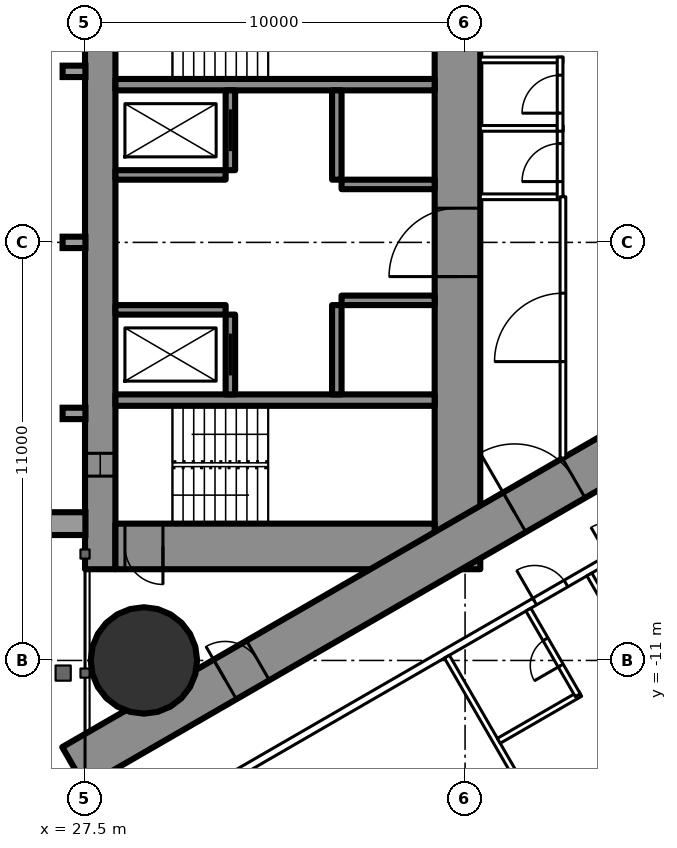
"""IFC4 building model, lengths in metres.
Left out: names, types, materials, properties, quantities, classifications, styles, units other than length and angle.
Written with IfcOpenShell. Run it as: python <this file> out.ifc"""

import sys

from ifc_helpers import new_model, si_unit, direction, frame, frame_2d, origin, origin_2d, place, context, subcontext, project, spatial, rectangle, circle, extrude, element, fill, save


model = new_model("IFC4")
c1 = context("Model", 3, precision=1e-05, world=origin(), true_north=direction((0.0, 1.0)))
c2 = subcontext(c1, "Body", "Model", "MODEL_VIEW")
j1 = project(units=[si_unit("LENGTHUNIT", "METRE"), si_unit("PLANEANGLEUNIT", "RADIAN")], contexts=[c1])
p1 = place(None, origin())
s1 = spatial("IfcSite", under=j1, at=p1, CompositionType="ELEMENT")
p2 = place(p1, origin())
s2 = spatial("IfcBuilding", under=s1, at=p2, CompositionType="ELEMENT")
p3 = place(p2, frame((0.0, 0.0, 198.3)))
s3 = spatial("IfcBuildingStorey", under=s2, at=p3, CompositionType="ELEMENT", Elevation=198.3)
p4 = place(p3, frame((29.05, -11.0, 0.0), z_axis=(0.0, 0.0, 1.0), x_axis=(1.0, 0.0, 0.0)))
e1 = element("IfcColumn", 1, at=p4, inside=s3, PredefinedType="COLUMN", context=c2, shape_type="SweptSolid", body=[
    extrude(circle(Radius=1.4, at=origin_2d()), origin(), (0.0, 0.0, 1.0), 3.5),
])
p5 = place(p3, frame((27.9, -8.6, 0.0), z_axis=(0.0, 0.0, 1.0), x_axis=(0.0, 1.0, 0.0)))
e2 = element("IfcWall", 2, at=p5, inside=s3, PredefinedType="SHEAR", context=c2, shape_type="SweptSolid", body=[
    extrude(rectangle(XDim=17.2, YDim=0.8, at=frame_2d((8.6, 0.0))), origin(), (0.0, 0.0, 1.0), 3.5),
])
p6 = place(p5, frame((2.45, 0.0, 0.6)))
e3 = element("IfcOpeningElement", 3, at=p6, cuts=e2, PredefinedType="OPENING", context=c2, shape_type="SweptSolid", body=[
    extrude(rectangle(XDim=0.6, YDim=2.1, at=frame_2d((0.3, 1.05))), frame((0.0, 0.41, 0.0), z_axis=(0.0, -1.0, 0.0), x_axis=(1.0, 0.0, 0.0)), (0.0, 0.0, 1.0), 0.82),
])
p7 = place(p5, frame((14.15, 0.0, 0.6)))
e4 = element("IfcOpeningElement", 4, at=p7, cuts=e2, PredefinedType="OPENING", context=c2, shape_type="SweptSolid", body=[
    extrude(rectangle(XDim=0.6, YDim=2.1, at=frame_2d((0.3, 1.05))), frame((0.0, 0.41, 0.0), z_axis=(0.0, -1.0, 0.0), x_axis=(1.0, 0.0, 0.0)), (0.0, 0.0, 1.0), 0.82),
])
p8 = place(p3, frame((37.3, -8.6, 0.0), z_axis=(0.0, 0.0, 1.0), x_axis=(0.0, 1.0, 0.0)))
e5 = element("IfcWall", 5, at=p8, inside=s3, PredefinedType="SHEAR", context=c2, shape_type="SweptSolid", body=[
    extrude(rectangle(XDim=17.2, YDim=1.2, at=frame_2d((8.6, 0.0))), origin(), (0.0, 0.0, 1.0), 3.5),
])
p9 = place(p8, frame((7.7, 0.0, 0.0)))
e6 = element("IfcOpeningElement", 6, at=p9, cuts=e5, PredefinedType="OPENING", context=c2, shape_type="SweptSolid", body=[
    extrude(rectangle(XDim=1.8, YDim=2.2, at=frame_2d((0.9, 1.1))), frame((0.0, 0.61, 0.0), z_axis=(0.0, -1.0, 0.0), x_axis=(1.0, 0.0, 0.0)), (0.0, 0.0, 1.0), 1.22),
])
p10 = place(p3, frame((28.3, -8.0, 0.0), z_axis=(0.0, 0.0, 1.0), x_axis=(1.0, 0.0, 0.0)))
e7 = element("IfcWall", 7, at=p10, inside=s3, PredefinedType="SHEAR", context=c2, shape_type="SweptSolid", body=[
    extrude(rectangle(XDim=8.4, YDim=1.2, at=frame_2d((4.2, 0.0))), origin(), (0.0, 0.0, 1.0), 3.5),
])
p11 = place(p10, frame((0.25, 0.0, 0.0)))
e8 = element("IfcOpeningElement", 8, at=p11, cuts=e7, PredefinedType="OPENING", context=c2, shape_type="SweptSolid", body=[
    extrude(rectangle(XDim=1.0, YDim=2.2, at=frame_2d((0.5, 1.1))), frame((0.0, 0.61, 0.0), z_axis=(0.0, -1.0, 0.0), x_axis=(1.0, 0.0, 0.0)), (0.0, 0.0, 1.0), 1.22),
])
for number, where, z_axis, x_axis in (
    (9, (28.3, -4.15, 0.0), (0.0, 0.0, 1.0), (1.0, 0.0, 0.0)),
    (10, (28.3, 4.15, 0.0), (0.0, 0.0, 1.0), (1.0, 0.0, 0.0)),
):
    element("IfcWall", number, at=place(p3, frame(where, z_axis=z_axis, x_axis=x_axis)), inside=s3, PredefinedType="SHEAR", context=c2, shape_type="SweptSolid", body=[
        extrude(rectangle(XDim=8.4, YDim=0.3, at=frame_2d((4.2, 0.0))), origin(), (0.0, 0.0, 1.0), 3.5),
    ])
p12 = place(p3, frame((31.325, -4.0, 0.0), z_axis=(0.0, 0.0, 1.0), x_axis=(0.0, 1.0, 0.0)))
e11 = element("IfcWall", 11, at=p12, inside=s3, PredefinedType="SHEAR", context=c2, shape_type="SweptSolid", body=[
    extrude(rectangle(XDim=2.1, YDim=0.25, at=frame_2d((1.05, 0.0))), origin(), (0.0, 0.0, 1.0), 3.5),
])
p13 = place(p12, frame((0.5, 0.0, 0.0)))
e12 = element("IfcOpeningElement", 12, at=p13, cuts=e11, PredefinedType="OPENING", context=c2, shape_type="SweptSolid", body=[
    extrude(rectangle(XDim=1.1, YDim=2.2, at=frame_2d((0.55, 1.1))), frame((0.0, 0.135, 0.0), z_axis=(0.0, -1.0, 0.0), x_axis=(1.0, 0.0, 0.0)), (0.0, 0.0, 1.0), 0.27),
])
p14 = place(p3, frame((34.125, -4.0, 0.0), z_axis=(0.0, 0.0, 1.0), x_axis=(0.0, 1.0, 0.0)))
e13 = element("IfcWall", 13, at=p14, inside=s3, PredefinedType="SHEAR", context=c2, shape_type="SweptSolid", body=[
    extrude(rectangle(XDim=2.35, YDim=0.25, at=frame_2d((1.175, 0.0))), origin(), (0.0, 0.0, 1.0), 3.5),
])
p15 = place(p3, frame((28.3, -1.775, 0.0), z_axis=(0.0, 0.0, 1.0), x_axis=(1.0, 0.0, 0.0)))
e14 = element("IfcWall", 14, at=p15, inside=s3, PredefinedType="SHEAR", context=c2, shape_type="SweptSolid", body=[
    extrude(rectangle(XDim=2.9, YDim=0.25, at=frame_2d((1.45, 0.0))), origin(), (0.0, 0.0, 1.0), 3.5),
])
p16 = place(p3, frame((34.25, -1.525, 0.0), z_axis=(0.0, 0.0, 1.0), x_axis=(1.0, 0.0, 0.0)))
e15 = element("IfcWall", 15, at=p16, inside=s3, PredefinedType="SHEAR", context=c2, shape_type="SweptSolid", body=[
    extrude(rectangle(XDim=2.45, YDim=0.25, at=frame_2d((1.225, 0.0))), origin(), (0.0, 0.0, 1.0), 3.5),
])
p17 = place(p3, frame((31.325, 1.9, 0.0), z_axis=(0.0, 0.0, 1.0), x_axis=(0.0, 1.0, 0.0)))
e16 = element("IfcWall", 16, at=p17, inside=s3, PredefinedType="SHEAR", context=c2, shape_type="SweptSolid", body=[
    extrude(rectangle(XDim=2.1, YDim=0.25, at=frame_2d((1.05, 0.0))), origin(), (0.0, 0.0, 1.0), 3.5),
])
p18 = place(p17, frame((0.5, 0.0, 0.0)))
e17 = element("IfcOpeningElement", 17, at=p18, cuts=e16, PredefinedType="OPENING", context=c2, shape_type="SweptSolid", body=[
    extrude(rectangle(XDim=1.1, YDim=2.2, at=frame_2d((0.55, 1.1))), frame((0.0, 0.135, 0.0), z_axis=(0.0, -1.0, 0.0), x_axis=(1.0, 0.0, 0.0)), (0.0, 0.0, 1.0), 0.27),
])
p19 = place(p3, frame((34.125, 1.65, 0.0), z_axis=(0.0, 0.0, 1.0), x_axis=(0.0, 1.0, 0.0)))
e18 = element("IfcWall", 18, at=p19, inside=s3, PredefinedType="SHEAR", context=c2, shape_type="SweptSolid", body=[
    extrude(rectangle(XDim=2.35, YDim=0.25, at=frame_2d((1.175, 0.0))), origin(), (0.0, 0.0, 1.0), 3.5),
])
p20 = place(p3, frame((28.3, 1.775, 0.0), z_axis=(0.0, 0.0, 1.0), x_axis=(1.0, 0.0, 0.0)))
e19 = element("IfcWall", 19, at=p20, inside=s3, PredefinedType="SHEAR", context=c2, shape_type="SweptSolid", body=[
    extrude(rectangle(XDim=2.9, YDim=0.25, at=frame_2d((1.45, 0.0))), origin(), (0.0, 0.0, 1.0), 3.5),
])
p21 = place(p3, frame((34.25, 1.525, 0.0), z_axis=(0.0, 0.0, 1.0), x_axis=(1.0, 0.0, 0.0)))
e20 = element("IfcWall", 20, at=p21, inside=s3, PredefinedType="SHEAR", context=c2, shape_type="SweptSolid", body=[
    extrude(rectangle(XDim=2.45, YDim=0.25, at=frame_2d((1.225, 0.0))), origin(), (0.0, 0.0, 1.0), 3.5),
])
p22 = place(p3, frame((27.2, -13.8, 0.0), z_axis=(0.0, 0.0, 1.0), x_axis=(0.866027159892, 0.499996958321, 0.0)))
e21 = element("IfcWall", 21, at=p22, inside=s3, PredefinedType="SHEAR", context=c2, shape_type="SweptSolid", body=[
    extrude(rectangle(XDim=27.947, YDim=1.2, at=frame_2d((13.973, 0.0))), origin(), (0.0, 0.0, 1.0), 3.5),
])
p23 = place(p22, frame((4.6, 0.0, 0.0)))
e22 = element("IfcOpeningElement", 22, at=p23, cuts=e21, PredefinedType="OPENING", context=c2, shape_type="SweptSolid", body=[
    extrude(rectangle(XDim=1.0, YDim=2.2, at=frame_2d((0.5, 1.1))), frame((0.0, 0.61, 0.0), z_axis=(0.0, -1.0, 0.0), x_axis=(1.0, 0.0, 0.0)), (0.0, 0.0, 1.0), 1.22),
])
p24 = place(p22, frame((13.395, 0.0, 0.0)))
e23 = element("IfcOpeningElement", 23, at=p24, cuts=e21, PredefinedType="OPENING", context=c2, shape_type="SweptSolid", body=[
    extrude(rectangle(XDim=1.8, YDim=2.2, at=frame_2d((0.9, 1.1))), frame((0.0, 0.61, 0.0), z_axis=(0.0, -1.0, 0.0), x_axis=(1.0, 0.0, 0.0)), (0.0, 0.0, 1.0), 1.22),
])
p25 = place(p3, frame((27.2, 13.8, 0.0), z_axis=(0.0, 0.0, 1.0), x_axis=(0.866024515034, -0.500001539357, 0.0)))
e24 = element("IfcWall", 24, at=p25, inside=s3, PredefinedType="SHEAR", context=c2, shape_type="SweptSolid", body=[
    extrude(rectangle(XDim=26.907, YDim=1.2, at=frame_2d((13.454, 0.0))), origin(), (0.0, 0.0, 1.0), 3.5),
])
p26 = place(p25, frame((4.6, 0.0, 0.0)))
e25 = element("IfcOpeningElement", 25, at=p26, cuts=e24, PredefinedType="OPENING", context=c2, shape_type="SweptSolid", body=[
    extrude(rectangle(XDim=1.0, YDim=2.2, at=frame_2d((0.5, 1.1))), frame((0.0, 0.61, 0.0), z_axis=(0.0, -1.0, 0.0), x_axis=(1.0, 0.0, 0.0)), (0.0, 0.0, 1.0), 1.22),
])
p27 = place(p25, frame((13.395, 0.0, 0.0)))
e26 = element("IfcOpeningElement", 26, at=p27, cuts=e24, PredefinedType="OPENING", context=c2, shape_type="SweptSolid", body=[
    extrude(rectangle(XDim=1.8, YDim=2.2, at=frame_2d((0.9, 1.1))), frame((0.0, 0.61, 0.0), z_axis=(0.0, -1.0, 0.0), x_axis=(1.0, 0.0, 0.0)), (0.0, 0.0, 1.0), 1.22),
])
p28 = place(p3, frame((27.959, -16.017, 0.0), z_axis=(0.0, 0.0, 1.0), x_axis=(0.866024151371, 0.500002169237, 0.0)))
e27 = element("IfcWall", 27, at=p28, inside=s3, PredefinedType="PARTITIONING", context=c2, shape_type="SweptSolid", body=[
    extrude(rectangle(XDim=32.034, YDim=0.2, at=frame_2d((16.017, 0.0))), origin(), (0.0, 0.0, 1.0), 3.25),
])
p29 = place(p28, frame((0.6, 0.0, 0.0)))
e28 = element("IfcOpeningElement", 28, at=p29, cuts=e27, PredefinedType="OPENING", context=c2, shape_type="SweptSolid", body=[
    extrude(rectangle(XDim=0.95, YDim=2.2, at=frame_2d((0.475, 1.1))), frame((0.0, 0.11, 0.0), z_axis=(0.0, -1.0, 0.0), x_axis=(1.0, 0.0, 0.0)), (0.0, 0.0, 1.0), 0.22),
])
p30 = place(p28, frame((13.132, 0.0, 0.0)))
e29 = element("IfcOpeningElement", 29, at=p30, cuts=e27, PredefinedType="OPENING", context=c2, shape_type="SweptSolid", body=[
    extrude(rectangle(XDim=0.95, YDim=2.2, at=frame_2d((0.475, 1.1))), frame((0.0, 0.11, 0.0), z_axis=(0.0, -1.0, 0.0), x_axis=(1.0, 0.0, 0.0)), (0.0, 0.0, 1.0), 0.22),
])
p31 = place(p28, frame((15.391, 0.0, 0.0)))
e30 = element("IfcOpeningElement", 30, at=p31, cuts=e27, PredefinedType="OPENING", context=c2, shape_type="SweptSolid", body=[
    extrude(rectangle(XDim=0.95, YDim=2.2, at=frame_2d((0.475, 1.1))), frame((0.0, 0.11, 0.0), z_axis=(0.0, -1.0, 0.0), x_axis=(1.0, 0.0, 0.0)), (0.0, 0.0, 1.0), 0.22),
])
p32 = place(p28, frame((19.441, 0.0, 0.0)))
e31 = element("IfcOpeningElement", 31, at=p32, cuts=e27, PredefinedType="OPENING", context=c2, shape_type="SweptSolid", body=[
    extrude(rectangle(XDim=0.95, YDim=2.2, at=frame_2d((0.475, 1.1))), frame((0.0, 0.11, 0.0), z_axis=(0.0, -1.0, 0.0), x_axis=(1.0, 0.0, 0.0)), (0.0, 0.0, 1.0), 0.22),
])
p33 = place(p28, frame((26.406, 0.0, 0.0)))
e32 = element("IfcOpeningElement", 32, at=p33, cuts=e27, PredefinedType="OPENING", context=c2, shape_type="SweptSolid", body=[
    extrude(rectangle(XDim=0.95, YDim=2.2, at=frame_2d((0.475, 1.1))), frame((0.0, 0.11, 0.0), z_axis=(0.0, -1.0, 0.0), x_axis=(1.0, 0.0, 0.0)), (0.0, 0.0, 1.0), 0.22),
])
p34 = place(p28, frame((28.87, 0.0, 0.0)))
e33 = element("IfcOpeningElement", 33, at=p34, cuts=e27, PredefinedType="OPENING", context=c2, shape_type="SweptSolid", body=[
    extrude(rectangle(XDim=1.8, YDim=2.2, at=frame_2d((0.9, 1.1))), frame((0.0, 0.11, 0.0), z_axis=(0.0, -1.0, 0.0), x_axis=(1.0, 0.0, 0.0)), (0.0, 0.0, 1.0), 0.22),
])
p35 = place(p3, frame((37.022, -10.9, 0.0), z_axis=(0.0, 0.0, 1.0), x_axis=(0.499998620953, -0.866026199976, 0.0)))
e34 = element("IfcWall", 34, at=p35, inside=s3, PredefinedType="PARTITIONING", context=c2, shape_type="SweptSolid", body=[
    extrude(rectangle(XDim=9.77, YDim=0.15, at=frame_2d((4.885, 0.0))), origin(), (0.0, 0.0, 1.0), 3.25),
])
p36 = place(p3, frame((40.769, -8.737, 0.0), z_axis=(0.0, 0.0, 1.0), x_axis=(0.500013115284, -0.866017831539, 0.0)))
e35 = element("IfcWall", 35, at=p36, inside=s3, PredefinedType="PARTITIONING", context=c2, shape_type="SweptSolid", body=[
    extrude(rectangle(XDim=7.198, YDim=0.15, at=frame_2d((3.599, 0.0))), origin(), (0.0, 0.0, 1.0), 2.3),
])
p37 = place(p3, frame((38.387, -13.115, 0.0), z_axis=(0.0, 0.0, 1.0), x_axis=(0.866073894602, 0.499916002032, 0.0)))
e36 = element("IfcWall", 36, at=p37, inside=s3, PredefinedType="PARTITIONING", context=c2, shape_type="SweptSolid", body=[
    extrude(rectangle(XDim=2.475, YDim=0.15, at=frame_2d((1.238, 0.0))), origin(), (0.0, 0.0, 1.0), 3.25),
])
p38 = place(p3, frame((39.166, -9.663, 0.0), z_axis=(0.0, 0.0, 1.0), x_axis=(0.500006934395, -0.866021400173, 0.0)))
e37 = element("IfcWall", 37, at=p38, inside=s3, PredefinedType="PARTITIONING", context=c2, shape_type="SweptSolid", body=[
    extrude(rectangle(XDim=2.6, YDim=0.15, at=frame_2d((1.3, 0.0))), origin(), (0.0, 0.0, 1.0), 3.25),
])
p39 = place(p38, frame((0.9, 0.0, 0.0)))
e38 = element("IfcOpeningElement", 38, at=p39, cuts=e37, PredefinedType="OPENING", context=c2, shape_type="SweptSolid", body=[
    extrude(rectangle(XDim=0.8, YDim=2.2, at=frame_2d((0.4, 1.1))), frame((0.0, 0.085, 0.0), z_axis=(0.0, -1.0, 0.0), x_axis=(1.0, 0.0, 0.0)), (0.0, 0.0, 1.0), 0.17),
])
for number, where, z_axis, x_axis in (
    (39, (37.9, 1.2, 0.0), (0.0, 0.0, 1.0), (1.0, 0.0, 0.0)),
    (40, (37.9, 3.0, 0.0), (0.0, 0.0, 1.0), (1.0, 0.0, 0.0)),
    (41, (37.9, 4.8, 0.0), (0.0, 0.0, 1.0), (1.0, 0.0, 0.0)),
):
    element("IfcWall", number, at=place(p3, frame(where, z_axis=z_axis, x_axis=x_axis)), inside=s3, PredefinedType="PARTITIONING", context=c2, shape_type="SweptSolid", body=[
        extrude(rectangle(XDim=2.175, YDim=0.15, at=frame_2d((1.087, 0.0))), origin(), (0.0, 0.0, 1.0), 3.25),
    ])
p40 = place(p3, frame((40.0, 1.125, 0.0), z_axis=(0.0, 0.0, 1.0), x_axis=(0.0, 1.0, 0.0)))
e42 = element("IfcWall", 42, at=p40, inside=s3, PredefinedType="PARTITIONING", context=c2, shape_type="SweptSolid", body=[
    extrude(rectangle(XDim=1.95, YDim=0.15, at=frame_2d((0.975, 0.0))), origin(), (0.0, 0.0, 1.0), 3.25),
])
p41 = place(p40, frame((0.475, 0.0, 0.0)))
e43 = element("IfcOpeningElement", 43, at=p41, cuts=e42, PredefinedType="OPENING", context=c2, shape_type="SweptSolid", body=[
    extrude(rectangle(XDim=1.0, YDim=2.2, at=frame_2d((0.5, 1.1))), frame((0.0, 0.085, 0.0), z_axis=(0.0, -1.0, 0.0), x_axis=(1.0, 0.0, 0.0)), (0.0, 0.0, 1.0), 0.17),
])
p42 = place(p3, frame((40.0, 2.925, 0.0), z_axis=(0.0, 0.0, 1.0), x_axis=(0.0, 1.0, 0.0)))
e44 = element("IfcWall", 44, at=p42, inside=s3, PredefinedType="PARTITIONING", context=c2, shape_type="SweptSolid", body=[
    extrude(rectangle(XDim=1.95, YDim=0.15, at=frame_2d((0.975, 0.0))), origin(), (0.0, 0.0, 1.0), 3.25),
])
p43 = place(p42, frame((0.475, 0.0, 0.0)))
e45 = element("IfcOpeningElement", 45, at=p43, cuts=e44, PredefinedType="OPENING", context=c2, shape_type="SweptSolid", body=[
    extrude(rectangle(XDim=1.0, YDim=2.2, at=frame_2d((0.5, 1.1))), frame((0.0, 0.085, 0.0), z_axis=(0.0, -1.0, 0.0), x_axis=(1.0, 0.0, 0.0)), (0.0, 0.0, 1.0), 0.17),
])
p44 = place(p3, frame((40.075, -5.674, 0.0), z_axis=(0.0, 0.0, 1.0), x_axis=(0.0, 1.0, 0.0)))
e46 = element("IfcWall", 46, at=p44, inside=s3, PredefinedType="PARTITIONING", context=c2, shape_type="SweptSolid", body=[
    extrude(rectangle(XDim=6.874, YDim=0.15, at=frame_2d((3.437, 0.0))), origin(), (0.0, 0.0, 1.0), 3.25),
])
p45 = place(p44, frame((2.537, 0.0, 0.0)))
e47 = element("IfcOpeningElement", 47, at=p45, cuts=e46, PredefinedType="OPENING", context=c2, shape_type="SweptSolid", body=[
    extrude(rectangle(XDim=1.8, YDim=2.2, at=frame_2d((0.9, 1.1))), frame((0.0, 0.085, 0.0), z_axis=(0.0, -1.0, 0.0), x_axis=(1.0, 0.0, 0.0)), (0.0, 0.0, 1.0), 0.17),
])
p46 = place(p39, origin())
e48 = element("IfcDoor", 48, at=p46, inside=s3, OperationType="SINGLE_SWING_RIGHT", PredefinedType="DOOR", context=c2, shape_type="SweptSolid", body=[
    extrude(rectangle(XDim=0.8, YDim=2.2, at=frame_2d((0.4, 1.1))), frame((0.0, 0.025, 0.0), z_axis=(0.0, -1.0, 0.0), x_axis=(1.0, 0.0, 0.0)), (0.0, 0.0, 1.0), 0.05),
])
fill(e38, e48)
p47 = place(p30, origin())
e49 = element("IfcDoor", 49, at=p47, inside=s3, OperationType="SINGLE_SWING_LEFT", PredefinedType="DOOR", context=c2, shape_type="SweptSolid", body=[
    extrude(rectangle(XDim=0.95, YDim=2.2, at=frame_2d((0.475, 1.1))), frame((0.0, 0.025, 0.0), z_axis=(0.0, -1.0, 0.0), x_axis=(1.0, 0.0, 0.0)), (0.0, 0.0, 1.0), 0.05),
])
fill(e29, e49)
p48 = place(p41, origin())
e50 = element("IfcDoor", 50, at=p48, inside=s3, OperationType="SINGLE_SWING_LEFT", PredefinedType="DOOR", context=c2, shape_type="SweptSolid", body=[
    extrude(rectangle(XDim=1.0, YDim=2.2, at=frame_2d((0.5, 1.1))), frame((0.0, 0.025, 0.0), z_axis=(0.0, -1.0, 0.0), x_axis=(1.0, 0.0, 0.0)), (0.0, 0.0, 1.0), 0.05),
])
fill(e43, e50)
p49 = place(p43, origin())
e51 = element("IfcDoor", 51, at=p49, inside=s3, OperationType="SINGLE_SWING_LEFT", PredefinedType="DOOR", context=c2, shape_type="SweptSolid", body=[
    extrude(rectangle(XDim=1.0, YDim=2.2, at=frame_2d((0.5, 1.1))), frame((0.0, 0.025, 0.0), z_axis=(0.0, -1.0, 0.0), x_axis=(1.0, 0.0, 0.0)), (0.0, 0.0, 1.0), 0.05),
])
fill(e45, e51)
p50 = place(p45, origin())
e52 = element("IfcDoor", 52, at=p50, inside=s3, OperationType="DOUBLE_DOOR_SINGLE_SWING", PredefinedType="DOOR", context=c2, shape_type="SweptSolid", body=[
    extrude(rectangle(XDim=1.8, YDim=2.2, at=frame_2d((0.9, 1.1))), frame((0.0, 0.025, 0.0), z_axis=(0.0, -1.0, 0.0), x_axis=(1.0, 0.0, 0.0)), (0.0, 0.0, 1.0), 0.05),
])
fill(e47, e52)
p51 = place(p23, origin())
e53 = element("IfcDoor", 53, at=p51, inside=s3, OperationType="SINGLE_SWING_LEFT", PredefinedType="DOOR", context=c2, shape_type="SweptSolid", body=[
    extrude(rectangle(XDim=1.0, YDim=2.2, at=frame_2d((0.5, 1.1))), frame((0.0, 0.025, 0.0), z_axis=(0.0, -1.0, 0.0), x_axis=(1.0, 0.0, 0.0)), (0.0, 0.0, 1.0), 0.05),
])
fill(e22, e53)
p52 = place(p24, origin())
e54 = element("IfcDoor", 54, at=p52, inside=s3, OperationType="DOUBLE_DOOR_SINGLE_SWING", PredefinedType="DOOR", context=c2, shape_type="SweptSolid", body=[
    extrude(rectangle(XDim=1.8, YDim=2.2, at=frame_2d((0.9, 1.1))), frame((0.0, 0.025, 0.0), z_axis=(0.0, -1.0, 0.0), x_axis=(1.0, 0.0, 0.0)), (0.0, 0.0, 1.0), 0.05),
])
fill(e23, e54)
p53 = place(p9, origin())
e55 = element("IfcDoor", 55, at=p53, inside=s3, OperationType="DOUBLE_DOOR_SINGLE_SWING", PredefinedType="DOOR", context=c2, shape_type="SweptSolid", body=[
    extrude(rectangle(XDim=1.8, YDim=2.2, at=frame_2d((0.9, 1.1))), frame((0.0, 0.025, 0.0), z_axis=(0.0, -1.0, 0.0), x_axis=(1.0, 0.0, 0.0)), (0.0, 0.0, 1.0), 0.05),
])
fill(e6, e55)
p54 = place(p11, origin())
e56 = element("IfcDoor", 56, at=p54, inside=s3, OperationType="SINGLE_SWING_RIGHT", PredefinedType="DOOR", context=c2, shape_type="SweptSolid", body=[
    extrude(rectangle(XDim=1.0, YDim=2.2, at=frame_2d((0.5, 1.1))), frame((0.0, 0.025, 0.0), z_axis=(0.0, -1.0, 0.0), x_axis=(1.0, 0.0, 0.0)), (0.0, 0.0, 1.0), 0.05),
])
fill(e8, e56)
p55 = place(p13, origin())
e57 = element("IfcDoor", 57, at=p55, inside=s3, OperationType="SLIDING_TO_LEFT", PredefinedType="USERDEFINED", context=c2, shape_type="SweptSolid", body=[
    extrude(rectangle(XDim=1.1, YDim=2.2, at=frame_2d((0.55, 1.1))), frame((0.0, 0.025, 0.0), z_axis=(0.0, -1.0, 0.0), x_axis=(1.0, 0.0, 0.0)), (0.0, 0.0, 1.0), 0.05),
])
fill(e12, e57)
p56 = place(p18, origin())
e58 = element("IfcDoor", 58, at=p56, inside=s3, OperationType="SLIDING_TO_LEFT", PredefinedType="USERDEFINED", context=c2, shape_type="SweptSolid", body=[
    extrude(rectangle(XDim=1.1, YDim=2.2, at=frame_2d((0.55, 1.1))), frame((0.0, 0.025, 0.0), z_axis=(0.0, -1.0, 0.0), x_axis=(1.0, 0.0, 0.0)), (0.0, 0.0, 1.0), 0.05),
])
fill(e17, e58)
p57 = place(p6, origin())
e59 = element("IfcWindow", 59, at=p57, inside=s3, PartitioningType="SINGLE_PANEL", PredefinedType="WINDOW", context=c2, shape_type="SweptSolid", body=[
    extrude(rectangle(XDim=0.6, YDim=2.1, at=frame_2d((0.3, 1.05))), frame((0.0, 0.03, 0.0), z_axis=(0.0, -1.0, 0.0), x_axis=(1.0, 0.0, 0.0)), (0.0, 0.0, 1.0), 0.06),
])
fill(e3, e59)
save(model, sys.argv[1])
